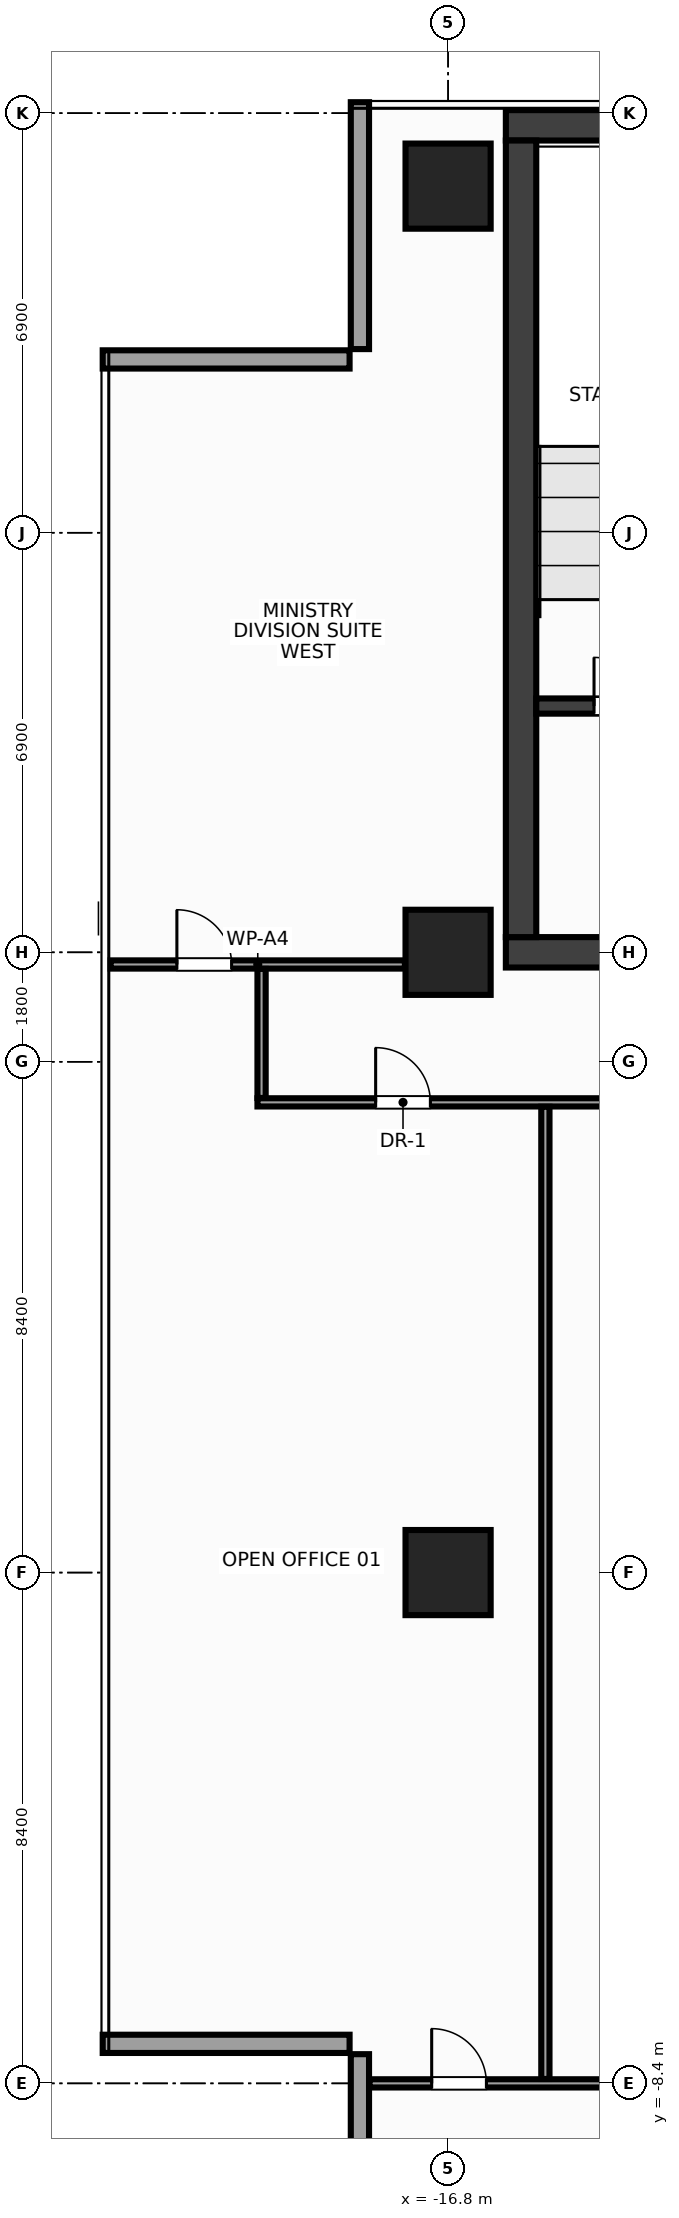
"""IFC4 building model, lengths in metres.
Left out: names, types, materials, properties, quantities, classifications, styles, units other than length and angle.
Written with IfcOpenShell. Run it as: python <this file> out.ifc"""

import sys

from ifc_helpers import new_model, si_unit, direction, frame, frame_2d, origin, origin_2d, place, context, subcontext, project, spatial, rectangle, extrude, source, transform, mapped, element, fill, save


model = new_model("IFC4")
c1 = context("Model", 3, precision=1e-05, world=origin(), true_north=direction((0.0, 1.0)))
c2 = subcontext(c1, "Body", "Model", "MODEL_VIEW")
j1 = project(units=[si_unit("LENGTHUNIT", "METRE"), si_unit("PLANEANGLEUNIT", "RADIAN")], contexts=[c1])
p1 = place(None, origin())
s1 = spatial("IfcSite", under=j1, at=p1, CompositionType="ELEMENT")
p2 = place(p1, origin())
s2 = spatial("IfcBuilding", under=s1, at=p2, CompositionType="ELEMENT")
p3 = place(p2, frame((0.0, 0.0, 236.0)))
s3 = spatial("IfcBuildingStorey", under=s2, at=p3, CompositionType="ELEMENT", Elevation=236.0)
m1 = source(origin(), c2, "Body", "SweptSolid", [
    extrude(rectangle(XDim=31.7, YDim=0.5, at=frame_2d((15.85, 0.0))), origin(), (0.0, 0.0, 1.0), 3.6),
])
p4 = place(p3, frame((-15.85, 23.8, 0.0), z_axis=(0.0, 0.0, 1.0), x_axis=(1.0, 0.0, 0.0)))
e1 = element("IfcWall", 1, at=p4, inside=s3, PredefinedType="SHEAR", context=c2, shape_type="MappedRepresentation", body=[
    mapped(m1, transform((0.0, 0.0, 0.0), x_axis=(1.0, 0.0, 0.0), y_axis=(0.0, 1.0, 0.0), z_axis=(0.0, 0.0, 1.0), scale=1.0)),
])
p5 = place(p3, frame((-15.85, 10.2, 0.0), z_axis=(0.0, 0.0, 1.0), x_axis=(1.0, 0.0, 0.0)))
e2 = element("IfcWall", 2, at=p5, inside=s3, PredefinedType="SHEAR", context=c2, shape_type="MappedRepresentation", body=[
    mapped(m1, transform((0.0, 0.0, 0.0), x_axis=(1.0, 0.0, 0.0), y_axis=(0.0, 1.0, 0.0), z_axis=(0.0, 0.0, 1.0), scale=1.0)),
])
p6 = place(p5, frame((1.7, 0.0, 0.0)))
e3 = element("IfcOpeningElement", 3, at=p6, cuts=e2, PredefinedType="OPENING", context=c2, shape_type="SweptSolid", body=[
    extrude(rectangle(XDim=1.6, YDim=2.15, at=frame_2d((0.8, 1.075))), frame((0.0, 0.262, 0.0), z_axis=(0.0, -1.0, 0.0), x_axis=(1.0, 0.0, 0.0)), (0.0, 0.0, 1.0), 0.524),
])
p7 = place(p5, frame((28.4, 0.0, 0.0)))
e4 = element("IfcOpeningElement", 4, at=p7, cuts=e2, PredefinedType="OPENING", context=c2, shape_type="SweptSolid", body=[
    extrude(rectangle(XDim=1.6, YDim=2.15, at=frame_2d((0.8, 1.075))), frame((0.0, 0.262, 0.0), z_axis=(0.0, -1.0, 0.0), x_axis=(1.0, 0.0, 0.0)), (0.0, 0.0, 1.0), 0.524),
])
p8 = place(p5, frame((15.1, 0.0, 0.0)))
e5 = element("IfcOpeningElement", 5, at=p8, cuts=e2, PredefinedType="OPENING", context=c2, shape_type="SweptSolid", body=[
    extrude(rectangle(XDim=1.5, YDim=2.2, at=frame_2d((0.75, 1.1))), frame((0.0, 0.262, 0.0), z_axis=(0.0, -1.0, 0.0), x_axis=(1.0, 0.0, 0.0)), (0.0, 0.0, 1.0), 0.524),
])
m2 = source(origin(), c2, "Body", "SweptSolid", [
    extrude(rectangle(XDim=13.1, YDim=0.5, at=frame_2d((6.55, 0.0))), origin(), (0.0, 0.0, 1.0), 3.6),
])
p9 = place(p3, frame((-15.6, 10.45, 0.0), z_axis=(0.0, 0.0, 1.0), x_axis=(0.0, 1.0, 0.0)))
e6 = element("IfcWall", 6, at=p9, inside=s3, PredefinedType="SHEAR", context=c2, shape_type="MappedRepresentation", body=[
    mapped(m2, transform((0.0, 0.0, 0.0), x_axis=(1.0, 0.0, 0.0), y_axis=(0.0, 1.0, 0.0), z_axis=(0.0, 0.0, 1.0), scale=1.0)),
])
m3 = source(origin(), c2, "Body", "SweptSolid", [
    extrude(rectangle(XDim=3.705, YDim=0.25, at=frame_2d((1.853, 0.0))), origin(), (0.0, 0.0, 1.0), 3.6),
])
p10 = place(p3, frame((-15.35, 14.25, 0.0), z_axis=(0.0, 0.0, 1.0), x_axis=(1.0, 0.0, 0.0)))
e7 = element("IfcWall", 7, at=p10, inside=s3, PredefinedType="SHEAR", context=c2, shape_type="MappedRepresentation", body=[
    mapped(m3, transform((0.0, 0.0, 0.0), x_axis=(1.0, 0.0, 0.0), y_axis=(0.0, 1.0, 0.0), z_axis=(0.0, 0.0, 1.0), scale=1.0)),
])
p11 = place(p10, frame((0.95, 0.0, 0.0)))
e8 = element("IfcOpeningElement", 8, at=p11, cuts=e7, PredefinedType="OPENING", context=c2, shape_type="SweptSolid", body=[
    extrude(rectangle(XDim=1.6, YDim=2.15, at=frame_2d((0.8, 1.075))), frame((0.0, 0.137, 0.0), z_axis=(0.0, -1.0, 0.0), x_axis=(1.0, 0.0, 0.0)), (0.0, 0.0, 1.0), 0.274),
])
m4 = source(origin(), c2, "Body", "SweptSolid", [
    extrude(rectangle(XDim=1.4, YDim=1.4, at=origin_2d()), origin(), (0.0, 0.0, 1.0), 3.6),
])
for number, where, z_axis, x_axis in (
    (9, (-16.8, 0.0, 0.0), (0.0, 0.0, 1.0), (1.0, 0.0, 0.0)),
    (10, (-16.8, 10.2, 0.0), (0.0, 0.0, 1.0), (1.0, 0.0, 0.0)),
    (11, (-16.8, 22.8, 0.0), (0.0, 0.0, 1.0), (1.0, 0.0, 0.0)),
):
    element("IfcColumn", number, at=place(p3, frame(where, z_axis=z_axis, x_axis=x_axis)), inside=s3, PredefinedType="COLUMN", context=c2, shape_type="MappedRepresentation", body=[
        mapped(m4, transform((0.0, 0.0, 0.0), x_axis=(1.0, 0.0, 0.0), y_axis=(0.0, 1.0, 0.0), z_axis=(0.0, 0.0, 1.0), scale=1.0)),
    ])
m5 = source(origin(), c2, "Body", "SweptSolid", [
    extrude(rectangle(XDim=4.06, YDim=0.3, at=frame_2d((2.03, 0.0))), origin(), (0.0, 0.0, 1.0), 2.75),
])
p12 = place(p3, frame((-18.25, 24.18, 0.0), z_axis=(0.0, 0.0, 1.0), x_axis=(0.0, -1.0, 0.0)))
e12 = element("IfcWall", 12, at=p12, inside=s3, PredefinedType="STANDARD", context=c2, shape_type="MappedRepresentation", body=[
    mapped(m5, transform((0.0, 0.0, 0.0), x_axis=(1.0, 0.0, 0.0), y_axis=(0.0, 1.0, 0.0), z_axis=(0.0, 0.0, 1.0), scale=1.0)),
])
m6 = source(origin(), c2, "Body", "SweptSolid", [
    extrude(rectangle(XDim=4.06, YDim=0.3, at=frame_2d((2.03, 0.0))), origin(), (0.0, 0.0, 1.0), 2.75),
])
for number, where, z_axis, x_axis in (
    (13, (-18.42, 19.95, 0.0), (0.0, 0.0, 1.0), (-1.0, 0.0, 0.0)),
    (14, (-22.48, -7.75, 0.0), (0.0, 0.0, 1.0), (1.0, 0.0, 0.0)),
    (15, (-18.25, -7.92, 0.0), (0.0, 0.0, 1.0), (0.0, -1.0, 0.0)),
):
    element("IfcWall", number, at=place(p3, frame(where, z_axis=z_axis, x_axis=x_axis)), inside=s3, PredefinedType="STANDARD", context=c2, shape_type="MappedRepresentation", body=[
        mapped(m6, transform((0.0, 0.0, 0.0), x_axis=(1.0, 0.0, 0.0), y_axis=(0.0, 1.0, 0.0), z_axis=(0.0, 0.0, 1.0), scale=1.0)),
    ])
m7 = source(origin(), c2, "Body", "SweptSolid", [
    extrude(rectangle(XDim=4.84, YDim=0.135, at=frame_2d((2.42, 0.0))), origin(), (0.0, 0.0, 1.0), 3.37),
])
p13 = place(p3, frame((-22.35, 10.0, 0.0), z_axis=(0.0, 0.0, 1.0), x_axis=(1.0, 0.0, 0.0)))
e16 = element("IfcWall", 16, at=p13, inside=s3, PredefinedType="PARTITIONING", context=c2, shape_type="MappedRepresentation", body=[
    mapped(m7, transform((0.0, 0.0, 0.0), x_axis=(1.0, 0.0, 0.0), y_axis=(0.0, 1.0, 0.0), z_axis=(0.0, 0.0, 1.0), scale=1.0)),
])
p14 = place(p13, frame((1.09, 0.0, 0.0)))
e17 = element("IfcOpeningElement", 17, at=p14, cuts=e16, PredefinedType="OPENING", context=c2, shape_type="SweptSolid", body=[
    extrude(rectangle(XDim=0.9, YDim=2.15, at=frame_2d((0.45, 1.075))), frame((0.0, 0.08, 0.0), z_axis=(0.0, -1.0, 0.0), x_axis=(1.0, 0.0, 0.0)), (0.0, 0.0, 1.0), 0.159),
])
m8 = source(origin(), c2, "Body", "SweptSolid", [
    extrude(rectangle(XDim=15.6, YDim=0.135, at=frame_2d((7.8, 0.0))), origin(), (0.0, 0.0, 1.0), 2.755),
])
p15 = place(p3, frame((-19.935, 7.732, 0.0), z_axis=(0.0, 0.0, 1.0), x_axis=(1.0, 0.0, 0.0)))
e18 = element("IfcWall", 18, at=p15, inside=s3, PredefinedType="PARTITIONING", context=c2, shape_type="MappedRepresentation", body=[
    mapped(m8, transform((0.0, 0.0, 0.0), x_axis=(1.0, 0.0, 0.0), y_axis=(0.0, 1.0, 0.0), z_axis=(0.0, 0.0, 1.0), scale=1.0)),
])
p16 = place(p15, frame((1.944, 0.0, 0.0)))
e19 = element("IfcOpeningElement", 19, at=p16, cuts=e18, PredefinedType="OPENING", context=c2, shape_type="SweptSolid", body=[
    extrude(rectangle(XDim=0.9, YDim=2.15, at=frame_2d((0.45, 1.075))), frame((0.0, 0.08, 0.0), z_axis=(0.0, -1.0, 0.0), x_axis=(1.0, 0.0, 0.0)), (0.0, 0.0, 1.0), 0.159),
])
p17 = place(p15, frame((9.691, 0.0, 0.0)))
e20 = element("IfcOpeningElement", 20, at=p17, cuts=e18, PredefinedType="OPENING", context=c2, shape_type="SweptSolid", body=[
    extrude(rectangle(XDim=0.9, YDim=2.15, at=frame_2d((0.45, 1.075))), frame((0.0, 0.08, 0.0), z_axis=(0.0, -1.0, 0.0), x_axis=(1.0, 0.0, 0.0)), (0.0, 0.0, 1.0), 0.159),
])
m9 = source(origin(), c2, "Body", "SweptSolid", [
    extrude(rectangle(XDim=2.123, YDim=0.135, at=frame_2d((1.061, 0.0))), origin(), (0.0, 0.0, 1.0), 3.37),
])
p18 = place(p3, frame((-19.867, 7.805, 0.0), z_axis=(0.0, 0.0, 1.0), x_axis=(0.0, 1.0, 0.0)))
e21 = element("IfcWall", 21, at=p18, inside=s3, PredefinedType="PARTITIONING", context=c2, shape_type="MappedRepresentation", body=[
    mapped(m9, transform((0.0, 0.0, 0.0), x_axis=(1.0, 0.0, 0.0), y_axis=(0.0, 1.0, 0.0), z_axis=(0.0, 0.0, 1.0), scale=1.0)),
])
m10 = source(origin(), c2, "Body", "SweptSolid", [
    extrude(rectangle(XDim=36.184, YDim=0.135, at=frame_2d((18.092, 0.0))), origin(), (0.0, 0.0, 1.0), 2.755),
])
p19 = place(p3, frame((-18.092, -8.4, 0.0), z_axis=(0.0, 0.0, 1.0), x_axis=(1.0, 0.0, 0.0)))
e22 = element("IfcWall", 22, at=p19, inside=s3, PredefinedType="PARTITIONING", context=c2, shape_type="MappedRepresentation", body=[
    mapped(m10, transform((0.0, 0.0, 0.0), x_axis=(1.0, 0.0, 0.0), y_axis=(0.0, 1.0, 0.0), z_axis=(0.0, 0.0, 1.0), scale=1.0)),
])
p20 = place(p19, frame((1.022, 0.0, 0.0)))
e23 = element("IfcOpeningElement", 23, at=p20, cuts=e22, PredefinedType="OPENING", context=c2, shape_type="SweptSolid", body=[
    extrude(rectangle(XDim=0.9, YDim=2.15, at=frame_2d((0.45, 1.075))), frame((0.0, 0.08, 0.0), z_axis=(0.0, -1.0, 0.0), x_axis=(1.0, 0.0, 0.0)), (0.0, 0.0, 1.0), 0.159),
])
p21 = place(p19, frame((9.142, 0.0, 0.0)))
e24 = element("IfcOpeningElement", 24, at=p21, cuts=e22, PredefinedType="OPENING", context=c2, shape_type="SweptSolid", body=[
    extrude(rectangle(XDim=0.9, YDim=2.15, at=frame_2d((0.45, 1.075))), frame((0.0, 0.08, 0.0), z_axis=(0.0, -1.0, 0.0), x_axis=(1.0, 0.0, 0.0)), (0.0, 0.0, 1.0), 0.159),
])
p22 = place(p19, frame((33.862, 0.0, 0.0)))
e25 = element("IfcOpeningElement", 25, at=p22, cuts=e22, PredefinedType="OPENING", context=c2, shape_type="SweptSolid", body=[
    extrude(rectangle(XDim=0.9, YDim=2.15, at=frame_2d((0.45, 1.075))), frame((0.0, 0.08, 0.0), z_axis=(0.0, -1.0, 0.0), x_axis=(1.0, 0.0, 0.0)), (0.0, 0.0, 1.0), 0.159),
])
p23 = place(p19, frame((18.942, 0.0, 0.0)))
e26 = element("IfcOpeningElement", 26, at=p23, cuts=e22, PredefinedType="OPENING", context=c2, shape_type="SweptSolid", body=[
    extrude(rectangle(XDim=0.9, YDim=2.15, at=frame_2d((0.45, 1.075))), frame((0.0, 0.08, 0.0), z_axis=(0.0, -1.0, 0.0), x_axis=(1.0, 0.0, 0.0)), (0.0, 0.0, 1.0), 0.159),
])
p24 = place(p19, frame((25.542, 0.0, 0.0)))
e27 = element("IfcOpeningElement", 27, at=p24, cuts=e22, PredefinedType="OPENING", context=c2, shape_type="SweptSolid", body=[
    extrude(rectangle(XDim=0.9, YDim=2.15, at=frame_2d((0.45, 1.075))), frame((0.0, 0.08, 0.0), z_axis=(0.0, -1.0, 0.0), x_axis=(1.0, 0.0, 0.0)), (0.0, 0.0, 1.0), 0.159),
])
m11 = source(origin(), c2, "Body", "SweptSolid", [
    extrude(rectangle(XDim=15.987, YDim=0.135, at=frame_2d((7.994, 0.0))), origin(), (0.0, 0.0, 1.0), 2.655),
])
p25 = place(p3, frame((-15.2, -8.327, 0.0), z_axis=(0.0, 0.0, 1.0), x_axis=(0.0, 1.0, 0.0)))
e28 = element("IfcWall", 28, at=p25, inside=s3, PredefinedType="PARTITIONING", context=c2, shape_type="MappedRepresentation", body=[
    mapped(m11, transform((0.0, 0.0, 0.0), x_axis=(1.0, 0.0, 0.0), y_axis=(0.0, 1.0, 0.0), z_axis=(0.0, 0.0, 1.0), scale=1.0)),
])
m12 = source(origin(), c2, "Body", "SweptSolid", [
    extrude(rectangle(XDim=1.6, YDim=2.15, at=frame_2d((0.8, 1.075))), frame((0.0, 0.025, 0.0), z_axis=(0.0, -1.0, 0.0), x_axis=(1.0, 0.0, 0.0)), (0.0, 0.0, 1.0), 0.05),
])
p26 = place(p11, origin())
e29 = element("IfcDoor", 29, at=p26, inside=s3, OperationType="DOUBLE_DOOR_SINGLE_SWING", PredefinedType="DOOR", context=c2, shape_type="MappedRepresentation", body=[
    mapped(m12, transform((0.0, 0.0, 0.0), x_axis=(1.0, 0.0, 0.0), y_axis=(0.0, 1.0, 0.0), z_axis=(0.0, 0.0, 1.0), scale=1.0)),
])
fill(e8, e29)
m13 = source(origin(), c2, "Body", "SweptSolid", [
    extrude(rectangle(XDim=0.9, YDim=2.15, at=frame_2d((0.45, 1.075))), frame((0.0, 0.025, 0.0), z_axis=(0.0, -1.0, 0.0), x_axis=(1.0, 0.0, 0.0)), (0.0, 0.0, 1.0), 0.05),
])
p27 = place(p16, origin())
e30 = element("IfcDoor", 30, at=p27, inside=s3, OperationType="SINGLE_SWING_LEFT", PredefinedType="DOOR", context=c2, shape_type="MappedRepresentation", body=[
    mapped(m13, transform((0.0, 0.0, 0.0), x_axis=(1.0, 0.0, 0.0), y_axis=(0.0, 1.0, 0.0), z_axis=(0.0, 0.0, 1.0), scale=1.0)),
])
fill(e19, e30)
p28 = place(p14, origin())
e31 = element("IfcDoor", 31, at=p28, inside=s3, OperationType="SINGLE_SWING_LEFT", PredefinedType="DOOR", context=c2, shape_type="MappedRepresentation", body=[
    mapped(m13, transform((0.0, 0.0, 0.0), x_axis=(1.0, 0.0, 0.0), y_axis=(0.0, 1.0, 0.0), z_axis=(0.0, 0.0, 1.0), scale=1.0)),
])
fill(e17, e31)
p29 = place(p20, origin())
e32 = element("IfcDoor", 32, at=p29, inside=s3, OperationType="SINGLE_SWING_LEFT", PredefinedType="DOOR", context=c2, shape_type="MappedRepresentation", body=[
    mapped(m13, transform((0.0, 0.0, 0.0), x_axis=(1.0, 0.0, 0.0), y_axis=(0.0, 1.0, 0.0), z_axis=(0.0, 0.0, 1.0), scale=1.0)),
])
fill(e23, e32)
save(model, sys.argv[1])
